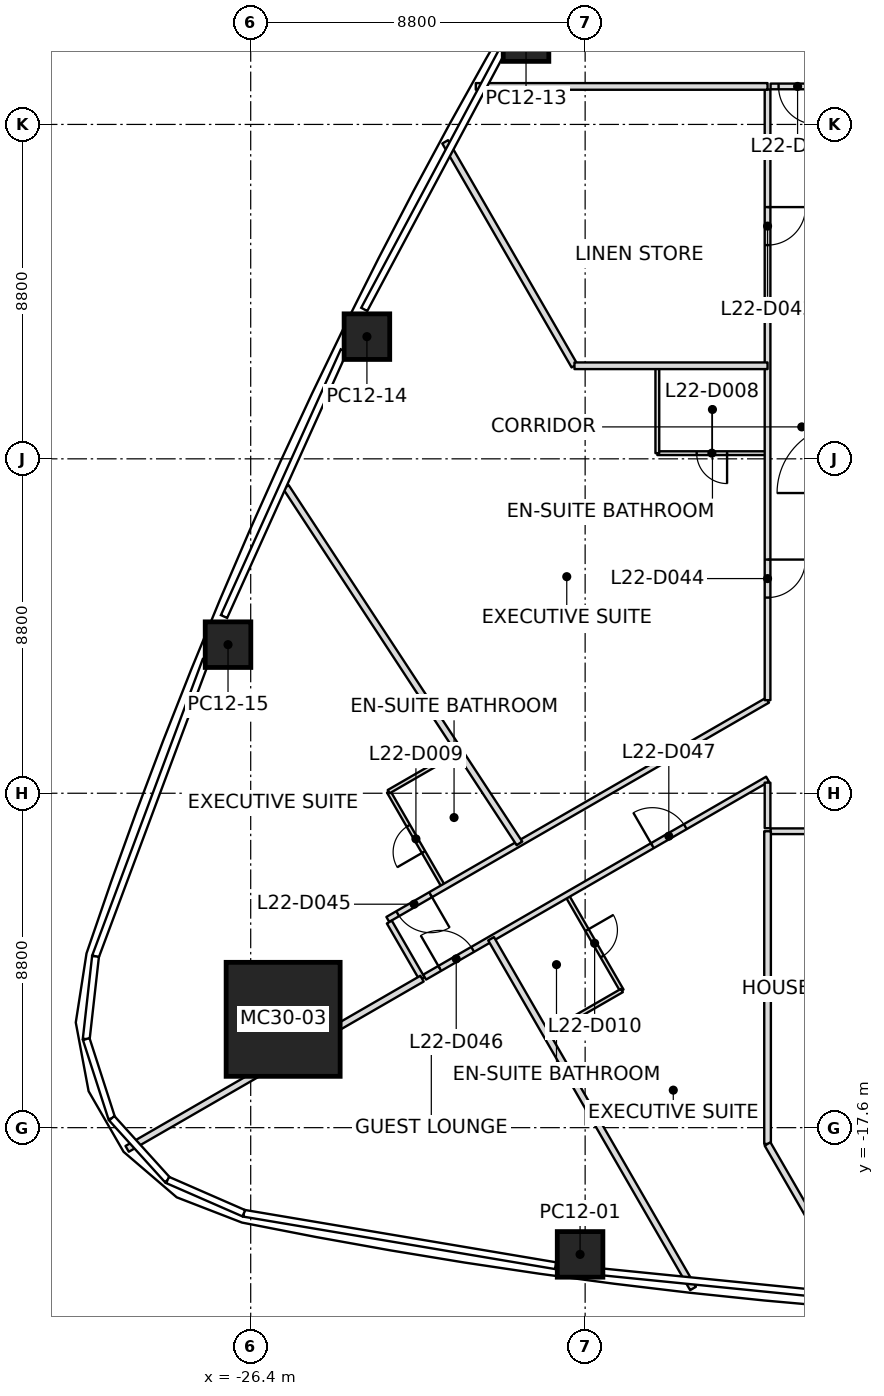
"""IFC4 building model, lengths in metres.
Left out: names, types, materials, properties, quantities, classifications, styles, units other than length and angle.
Written with IfcOpenShell. Run it as: python <this file> out.ifc"""

import sys

from ifc_helpers import new_model, si_unit, direction, frame, frame_2d, origin, origin_2d, place, context, subcontext, project, spatial, rectangle, extrude, clip, halfspace, element, fill, save


model = new_model("IFC4")
c1 = context("Model", 3, precision=1e-05, world=origin(), true_north=direction((0.0, 1.0)))
c2 = subcontext(c1, "Body", "Model", "MODEL_VIEW")
j1 = project(units=[si_unit("LENGTHUNIT", "METRE"), si_unit("PLANEANGLEUNIT", "RADIAN")], contexts=[c1])
p1 = place(None, origin())
s1 = spatial("IfcSite", under=j1, at=p1, CompositionType="ELEMENT")
p2 = place(p1, origin())
s2 = spatial("IfcBuilding", under=s1, at=p2, CompositionType="ELEMENT")
p3 = place(p2, frame((0.0, 0.0, 103.5)))
s3 = spatial("IfcBuildingStorey", under=s2, at=p3, CompositionType="ELEMENT", Elevation=103.5)
p4 = place(p3, frame((-25.546, -14.749, 0.0), z_axis=(0.030400226529, 0.017607072632, 0.999382718092), x_axis=(0.999537806302, -0.000535506504, -0.030395509632)))
e1 = element("IfcColumn", 1, at=p4, inside=s3, PredefinedType="COLUMN", context=c2, shape_type="SweptSolid", body=[
    clip(extrude(rectangle(XDim=3.0, YDim=3.0, at=origin_2d()), origin(), (0.0, 0.0, 1.0), 3.702), halfspace(frame((0.0, 0.0, 3.691)), False)),
])
p5 = place(p3, frame((-17.733, -20.935, 0.0), z_axis=(0.01919682326, 0.011280607483, 0.999752084205), x_axis=(-0.990948907943, 0.133090565371, 0.017526073608)))
e2 = element("IfcColumn", 2, at=p5, inside=s3, PredefinedType="COLUMN", context=c2, shape_type="SweptSolid", body=[
    clip(extrude(rectangle(XDim=1.2, YDim=1.2, at=origin_2d()), origin(), (0.0, 0.0, 1.0), 3.701), halfspace(frame((0.0, 0.0, 3.698)), False)),
])
p6 = place(p3, frame((-19.155, 11.059, 0.0), z_axis=(0.010688725148, -0.006202099777, 0.999923639641), x_axis=(0.499971436973, 0.8660418936, 2.7223042e-05)))
e3 = element("IfcColumn", 3, at=p6, inside=s3, PredefinedType="COLUMN", context=c2, shape_type="SweptSolid", body=[
    clip(extrude(rectangle(XDim=1.2, YDim=1.2, at=origin_2d()), origin(), (0.0, 0.0, 1.0), 3.7), halfspace(frame((0.0, 0.0, 3.699)), False)),
])
p7 = place(p3, frame((-23.342, 3.216, 0.0), z_axis=(0.015240685517, 0.002243217782, 0.999881337699), x_axis=(0.44116957044, 0.897381224024, -0.008737785047)))
e4 = element("IfcColumn", 4, at=p7, inside=s3, PredefinedType="COLUMN", context=c2, shape_type="SweptSolid", body=[
    clip(extrude(rectangle(XDim=1.2, YDim=1.2, at=origin_2d()), origin(), (0.0, 0.0, 1.0), 3.7), halfspace(frame((0.0, 0.0, 3.698)), False)),
])
p8 = place(p3, frame((-26.997, -4.89, 0.0), z_axis=(0.0193947257, 0.010950763491, 0.999751931928), x_axis=(0.380412982206, 0.924650979293, -0.0175079828)))
e5 = element("IfcColumn", 5, at=p8, inside=s3, PredefinedType="COLUMN", context=c2, shape_type="SweptSolid", body=[
    clip(extrude(rectangle(XDim=1.2, YDim=1.2, at=origin_2d()), origin(), (0.0, 0.0, 1.0), 3.701), halfspace(frame((0.0, 0.0, 3.698)), False)),
])
p9 = place(p3, frame((-21.892, -13.679, 0.0), z_axis=(0.0, 0.0, 1.0), x_axis=(-0.866027664105, -0.49999608499, 0.0)))
e6 = element("IfcWall", 6, at=p9, inside=s3, PredefinedType="PARTITIONING", context=c2, shape_type="SweptSolid", body=[
    extrude(rectangle(XDim=8.959, YDim=0.175, at=frame_2d((4.479, 0.0))), origin(), (0.0, 0.0, 1.0), 2.934),
])
p10 = place(p3, frame((-19.328, -10.12, 0.0), z_axis=(0.0, 0.0, 1.0), x_axis=(-0.548041487863, 0.836451150744, 0.0)))
e7 = element("IfcWall", 7, at=p10, inside=s3, PredefinedType="PARTITIONING", context=c2, shape_type="SweptSolid", body=[
    extrude(rectangle(XDim=11.215, YDim=0.175, at=frame_2d((5.608, 0.0))), origin(), (0.0, 0.0, 1.0), 2.934),
])
p11 = place(p3, frame((-21.283, 8.342, 0.0), z_axis=(0.0, 0.0, 1.0), x_axis=(0.500028898749, -0.866008718441, 0.0)))
e8 = element("IfcWall", 8, at=p11, inside=s3, PredefinedType="PARTITIONING", context=c2, shape_type="SweptSolid", body=[
    extrude(rectangle(XDim=6.804, YDim=0.175, at=frame_2d((3.402, 0.0))), origin(), (0.0, 0.0, 1.0), 2.934),
])
p12 = place(p3, frame((-17.881, 2.449, 0.0), z_axis=(0.0, 0.0, 1.0), x_axis=(1.0, 0.0, 0.0)))
e9 = element("IfcWall", 9, at=p12, inside=s3, PredefinedType="PARTITIONING", context=c2, shape_type="SweptSolid", body=[
    extrude(rectangle(XDim=5.081, YDim=0.175, at=frame_2d((2.54, 0.0))), origin(), (0.0, 0.0, 1.0), 3.093),
])
p13 = place(p3, frame((-12.8, 9.8, 0.0), z_axis=(0.0, 0.0, 1.0), x_axis=(-1.0, 0.0, 0.0)))
e10 = element("IfcWall", 10, at=p13, inside=s3, PredefinedType="PARTITIONING", context=c2, shape_type="SweptSolid", body=[
    extrude(rectangle(XDim=7.677, YDim=0.175, at=frame_2d((3.838, 0.0))), origin(), (0.0, 0.0, 1.0), 2.934),
])
p14 = place(p3, frame((-14.761, -21.832, 0.0), z_axis=(0.0, 0.0, 1.0), x_axis=(-0.500013467546, 0.866017628154, 0.0)))
e11 = element("IfcWall", 11, at=p14, inside=s3, PredefinedType="PARTITIONING", context=c2, shape_type="SweptSolid", body=[
    extrude(rectangle(XDim=10.627, YDim=0.175, at=frame_2d((5.313, 0.0))), origin(), (0.0, 0.0, 1.0), 2.934),
])
p15 = place(p3, frame((-12.8, -9.8, 0.0), z_axis=(0.0, 0.0, 1.0), x_axis=(0.0, -1.0, 0.0)))
e12 = element("IfcWall", 12, at=p15, inside=s3, PredefinedType="PARTITIONING", context=c2, shape_type="SweptSolid", body=[
    extrude(rectangle(XDim=8.229, YDim=0.175, at=frame_2d((4.115, 0.0))), origin(), (0.0, 0.0, 1.0), 3.15),
])
p16 = place(p3, frame((-12.8, -18.029, 0.0), z_axis=(0.0, 0.0, 1.0), x_axis=(0.500007611576, -0.866021009194, 0.0)))
e13 = element("IfcWall", 13, at=p16, inside=s3, PredefinedType="PARTITIONING", context=c2, shape_type="SweptSolid", body=[
    extrude(rectangle(XDim=4.867, YDim=0.175, at=frame_2d((2.433, 0.0))), origin(), (0.0, 0.0, 1.0), 2.934),
])
p17 = place(p3, frame((-12.8, -6.351, 0.0), z_axis=(0.0, 0.0, 1.0), x_axis=(-0.866023496323, -0.500003303805, 0.0)))
e14 = element("IfcWall", 14, at=p17, inside=s3, PredefinedType="PARTITIONING", context=c2, shape_type="SweptSolid", body=[
    extrude(rectangle(XDim=11.538, YDim=0.15, at=frame_2d((5.769, 0.0))), origin(), (0.0, 0.0, 1.0), 2.947),
])
p18 = place(p17, frame((10.238, 0.0, 0.0)))
e15 = element("IfcOpeningElement", 15, at=p18, cuts=e14, PredefinedType="OPENING", context=c2, shape_type="SweptSolid", body=[
    extrude(rectangle(XDim=1.0, YDim=2.1, at=frame_2d((0.5, 1.05))), frame((0.0, 0.075, 0.0), z_axis=(0.0, -1.0, 0.0), x_axis=(1.0, 0.0, 0.0)), (0.0, 0.0, 1.0), 0.15),
])
p19 = place(p3, frame((-22.752, -12.189, 0.0), z_axis=(0.0, 0.0, 1.0), x_axis=(0.500062383118, -0.865989383878, 0.0)))
e16 = element("IfcWall", 16, at=p19, inside=s3, PredefinedType="PARTITIONING", context=c2, shape_type="SweptSolid", body=[
    extrude(rectangle(XDim=1.72, YDim=0.15, at=frame_2d((0.86, 0.0))), origin(), (0.0, 0.0, 1.0), 2.797),
])
p20 = place(p3, frame((-21.823, -13.639, 0.0), z_axis=(0.0, 0.0, 1.0), x_axis=(0.86602247392, 0.500005074639, 0.0)))
e17 = element("IfcWall", 17, at=p20, inside=s3, PredefinedType="PARTITIONING", context=c2, shape_type="SweptSolid", body=[
    extrude(rectangle(XDim=10.419, YDim=0.15, at=frame_2d((5.209, 0.0))), origin(), (0.0, 0.0, 1.0), 2.797),
])
p21 = place(p20, frame((0.459, 0.0, 0.0)))
e18 = element("IfcOpeningElement", 18, at=p21, cuts=e17, PredefinedType="OPENING", context=c2, shape_type="SweptSolid", body=[
    extrude(rectangle(XDim=1.0, YDim=2.1, at=frame_2d((0.5, 1.05))), frame((0.0, 0.075, 0.0), z_axis=(0.0, -1.0, 0.0), x_axis=(1.0, 0.0, 0.0)), (0.0, 0.0, 1.0), 0.15),
])
p22 = place(p20, frame((6.919, 0.0, 0.0)))
e19 = element("IfcOpeningElement", 19, at=p22, cuts=e17, PredefinedType="OPENING", context=c2, shape_type="SweptSolid", body=[
    extrude(rectangle(XDim=1.0, YDim=2.1, at=frame_2d((0.5, 1.05))), frame((0.0, 0.075, 0.0), z_axis=(0.0, -1.0, 0.0), x_axis=(1.0, 0.0, 0.0)), (0.0, 0.0, 1.0), 0.15),
])
p23 = place(p3, frame((-12.8, -8.521, 0.0), z_axis=(0.0, 0.0, 1.0), x_axis=(0.0, -1.0, 0.0)))
e20 = element("IfcWall", 20, at=p23, inside=s3, PredefinedType="PARTITIONING", context=c2, shape_type="SweptSolid", body=[
    extrude(rectangle(XDim=1.199, YDim=0.15, at=frame_2d((0.6, 0.0))), origin(), (0.0, 0.0, 1.0), 2.797),
])
p24 = place(p3, frame((-12.8, 9.72, 0.0), z_axis=(0.0, 0.0, 1.0), x_axis=(0.0, -1.0, 0.0)))
e21 = element("IfcWall", 21, at=p24, inside=s3, PredefinedType="PARTITIONING", context=c2, shape_type="SweptSolid", body=[
    extrude(rectangle(XDim=16.071, YDim=0.15, at=frame_2d((8.035, 0.0))), origin(), (0.0, 0.0, 1.0), 2.947),
])
p25 = place(p24, frame((3.095, 0.0, 0.0)))
e22 = element("IfcOpeningElement", 22, at=p25, cuts=e21, PredefinedType="OPENING", context=c2, shape_type="SweptSolid", body=[
    extrude(rectangle(XDim=1.0, YDim=2.1, at=frame_2d((0.5, 1.05))), frame((0.0, 0.075, 0.0), z_axis=(0.0, -1.0, 0.0), x_axis=(1.0, 0.0, 0.0)), (0.0, 0.0, 1.0), 0.15),
])
p26 = place(p24, frame((12.371, 0.0, 0.0)))
e23 = element("IfcOpeningElement", 23, at=p26, cuts=e21, PredefinedType="OPENING", context=c2, shape_type="SweptSolid", body=[
    extrude(rectangle(XDim=1.0, YDim=2.1, at=frame_2d((0.5, 1.05))), frame((0.0, 0.075, 0.0), z_axis=(0.0, -1.0, 0.0), x_axis=(1.0, 0.0, 0.0)), (0.0, 0.0, 1.0), 0.15),
])
p27 = place(p3, frame((-12.72, -9.8, 0.0), z_axis=(0.0, 0.0, 1.0), x_axis=(1.0, 0.0, 0.0)))
e24 = element("IfcWall", 24, at=p27, inside=s3, PredefinedType="PARTITIONING", context=c2, shape_type="SweptSolid", body=[
    extrude(rectangle(XDim=25.44, YDim=0.15, at=frame_2d((12.72, 0.0))), origin(), (0.0, 0.0, 1.0), 3.017),
])
p28 = place(p27, frame((1.62, 0.0, 0.0)))
e25 = element("IfcOpeningElement", 25, at=p28, cuts=e24, PredefinedType="OPENING", context=c2, shape_type="SweptSolid", body=[
    extrude(rectangle(XDim=1.0, YDim=2.1, at=frame_2d((0.5, 1.05))), frame((0.0, 0.075, 0.0), z_axis=(0.0, -1.0, 0.0), x_axis=(1.0, 0.0, 0.0)), (0.0, 0.0, 1.0), 0.15),
])
p29 = place(p27, frame((7.22, 0.0, 0.0)))
e26 = element("IfcOpeningElement", 26, at=p29, cuts=e24, PredefinedType="OPENING", context=c2, shape_type="SweptSolid", body=[
    extrude(rectangle(XDim=1.0, YDim=2.1, at=frame_2d((0.5, 1.05))), frame((0.0, 0.075, 0.0), z_axis=(0.0, -1.0, 0.0), x_axis=(1.0, 0.0, 0.0)), (0.0, 0.0, 1.0), 0.15),
])
p30 = place(p27, frame((10.02, 0.0, 0.0)))
e27 = element("IfcOpeningElement", 27, at=p30, cuts=e24, PredefinedType="OPENING", context=c2, shape_type="SweptSolid", body=[
    extrude(rectangle(XDim=1.0, YDim=2.1, at=frame_2d((0.5, 1.05))), frame((0.0, 0.075, 0.0), z_axis=(0.0, -1.0, 0.0), x_axis=(1.0, 0.0, 0.0)), (0.0, 0.0, 1.0), 0.15),
])
p31 = place(p27, frame((15.42, 0.0, 0.0)))
e28 = element("IfcOpeningElement", 28, at=p31, cuts=e24, PredefinedType="OPENING", context=c2, shape_type="SweptSolid", body=[
    extrude(rectangle(XDim=1.0, YDim=2.1, at=frame_2d((0.5, 1.05))), frame((0.0, 0.075, 0.0), z_axis=(0.0, -1.0, 0.0), x_axis=(1.0, 0.0, 0.0)), (0.0, 0.0, 1.0), 0.15),
])
p32 = place(p27, frame((19.82, 0.0, 0.0)))
e29 = element("IfcOpeningElement", 29, at=p32, cuts=e24, PredefinedType="OPENING", context=c2, shape_type="SweptSolid", body=[
    extrude(rectangle(XDim=1.0, YDim=2.1, at=frame_2d((0.5, 1.05))), frame((0.0, 0.075, 0.0), z_axis=(0.0, -1.0, 0.0), x_axis=(1.0, 0.0, 0.0)), (0.0, 0.0, 1.0), 0.15),
])
p33 = place(p3, frame((-4.08, 9.8, 0.0), z_axis=(0.0, 0.0, 1.0), x_axis=(-1.0, 0.0, 0.0)))
e30 = element("IfcWall", 30, at=p33, inside=s3, PredefinedType="PARTITIONING", context=c2, shape_type="SweptSolid", body=[
    extrude(rectangle(XDim=8.64, YDim=0.15, at=frame_2d((4.32, 0.0))), origin(), (0.0, 0.0, 1.0), 2.947),
])
p34 = place(p33, frame((7.43, 0.0, 0.0)))
e31 = element("IfcOpeningElement", 31, at=p34, cuts=e30, PredefinedType="OPENING", context=c2, shape_type="SweptSolid", body=[
    extrude(rectangle(XDim=1.0, YDim=2.1, at=frame_2d((0.5, 1.05))), frame((0.0, 0.075, 0.0), z_axis=(0.0, -1.0, 0.0), x_axis=(1.0, 0.0, 0.0)), (0.0, 0.0, 1.0), 0.15),
])
p35 = place(p3, frame((-21.335, -11.244, 0.0), z_axis=(0.0, 0.0, 1.0), x_axis=(-0.499999802827, 0.866025517622, 0.0)))
e32 = element("IfcWall", 32, at=p35, inside=s3, PredefinedType="PARTITIONING", context=c2, shape_type="SweptSolid", body=[
    extrude(rectangle(XDim=2.87, YDim=0.1, at=frame_2d((1.435, 0.0))), origin(), (0.0, 0.0, 1.0), 3.15),
])
p36 = place(p35, frame((1.035, 0.0, 0.0)))
e33 = element("IfcOpeningElement", 33, at=p36, cuts=e32, PredefinedType="OPENING", context=c2, shape_type="SweptSolid", body=[
    extrude(rectangle(XDim=0.8, YDim=2.1, at=frame_2d((0.4, 1.05))), frame((0.0, 0.05, 0.0), z_axis=(0.0, -1.0, 0.0), x_axis=(1.0, 0.0, 0.0)), (0.0, 0.0, 1.0), 0.1),
])
p37 = place(p3, frame((-22.77, -8.758, 0.0), z_axis=(0.0, 0.0, 1.0), x_axis=(0.866017224141, 0.500014167291, 0.0)))
e34 = element("IfcWall", 34, at=p37, inside=s3, PredefinedType="PARTITIONING", context=c2, shape_type="SweptSolid", body=[
    extrude(rectangle(XDim=2.27, YDim=0.1, at=frame_2d((1.135, 0.0))), origin(), (0.0, 0.0, 1.0), 3.15),
])
p38 = place(p3, frame((-18.068, -11.505, 0.0), z_axis=(0.0, 0.0, 1.0), x_axis=(0.500036638401, -0.866004249561, 0.0)))
e35 = element("IfcWall", 35, at=p38, inside=s3, PredefinedType="PARTITIONING", context=c2, shape_type="SweptSolid", body=[
    extrude(rectangle(XDim=2.87, YDim=0.1, at=frame_2d((1.435, 0.0))), origin(), (0.0, 0.0, 1.0), 2.797),
])
p39 = place(p38, frame((1.035, 0.0, 0.0)))
e36 = element("IfcOpeningElement", 36, at=p39, cuts=e35, PredefinedType="OPENING", context=c2, shape_type="SweptSolid", body=[
    extrude(rectangle(XDim=0.8, YDim=2.1, at=frame_2d((0.4, 1.05))), frame((0.0, 0.05, 0.0), z_axis=(0.0, -1.0, 0.0), x_axis=(1.0, 0.0, 0.0)), (0.0, 0.0, 1.0), 0.1),
])
p40 = place(p3, frame((-16.633, -13.991, 0.0), z_axis=(0.0, 0.0, 1.0), x_axis=(-0.866017224141, -0.500014167291, 0.0)))
e37 = element("IfcWall", 37, at=p40, inside=s3, PredefinedType="PARTITIONING", context=c2, shape_type="SweptSolid", body=[
    extrude(rectangle(XDim=2.27, YDim=0.1, at=frame_2d((1.135, 0.0))), origin(), (0.0, 0.0, 1.0), 3.15),
])
p41 = place(p3, frame((-12.83, 0.149, 0.0), z_axis=(0.0, 0.0, 1.0), x_axis=(-1.0, 0.0, 0.0)))
e38 = element("IfcWall", 38, at=p41, inside=s3, PredefinedType="PARTITIONING", context=c2, shape_type="SweptSolid", body=[
    extrude(rectangle(XDim=2.87, YDim=0.1, at=frame_2d((1.435, 0.0))), origin(), (0.0, 0.0, 1.0), 3.15),
])
p42 = place(p41, frame((1.035, 0.0, 0.0)))
e39 = element("IfcOpeningElement", 39, at=p42, cuts=e38, PredefinedType="OPENING", context=c2, shape_type="SweptSolid", body=[
    extrude(rectangle(XDim=0.8, YDim=2.1, at=frame_2d((0.4, 1.05))), frame((0.0, 0.05, 0.0), z_axis=(0.0, -1.0, 0.0), x_axis=(1.0, 0.0, 0.0)), (0.0, 0.0, 1.0), 0.1),
])
p43 = place(p3, frame((-15.7, 0.149, 0.0), z_axis=(0.0, 0.0, 1.0), x_axis=(0.0, 1.0, 0.0)))
e40 = element("IfcWall", 40, at=p43, inside=s3, PredefinedType="PARTITIONING", context=c2, shape_type="SweptSolid", body=[
    extrude(rectangle(XDim=2.27, YDim=0.1, at=frame_2d((1.135, 0.0))), origin(), (0.0, 0.0, 1.0), 3.15),
])
p44 = place(p34, origin())
e41 = element("IfcDoor", 41, at=p44, inside=s3, OperationType="SINGLE_SWING_RIGHT", PredefinedType="DOOR", context=c2, shape_type="SweptSolid", body=[
    extrude(rectangle(XDim=1.0, YDim=2.1, at=frame_2d((0.5, 1.05))), frame((0.0, 0.025, 0.0), z_axis=(0.0, -1.0, 0.0), x_axis=(1.0, 0.0, 0.0)), (0.0, 0.0, 1.0), 0.05),
])
fill(e31, e41)
p45 = place(p25, origin())
e42 = element("IfcDoor", 42, at=p45, inside=s3, OperationType="SINGLE_SWING_LEFT", PredefinedType="DOOR", context=c2, shape_type="SweptSolid", body=[
    extrude(rectangle(XDim=1.0, YDim=2.1, at=frame_2d((0.5, 1.05))), frame((0.0, 0.025, 0.0), z_axis=(0.0, -1.0, 0.0), x_axis=(1.0, 0.0, 0.0)), (0.0, 0.0, 1.0), 0.05),
])
fill(e22, e42)
p46 = place(p26, origin())
e43 = element("IfcDoor", 43, at=p46, inside=s3, OperationType="SINGLE_SWING_RIGHT", PredefinedType="DOOR", context=c2, shape_type="SweptSolid", body=[
    extrude(rectangle(XDim=1.0, YDim=2.1, at=frame_2d((0.5, 1.05))), frame((0.0, 0.025, 0.0), z_axis=(0.0, -1.0, 0.0), x_axis=(1.0, 0.0, 0.0)), (0.0, 0.0, 1.0), 0.05),
])
fill(e23, e43)
p47 = place(p42, origin())
e44 = element("IfcDoor", 44, at=p47, inside=s3, OperationType="SINGLE_SWING_RIGHT", PredefinedType="DOOR", context=c2, shape_type="SweptSolid", body=[
    extrude(rectangle(XDim=0.8, YDim=2.1, at=frame_2d((0.4, 1.05))), frame((0.0, 0.025, 0.0), z_axis=(0.0, -1.0, 0.0), x_axis=(1.0, 0.0, 0.0)), (0.0, 0.0, 1.0), 0.05),
])
fill(e39, e44)
p48 = place(p18, origin())
e45 = element("IfcDoor", 45, at=p48, inside=s3, OperationType="SINGLE_SWING_RIGHT", PredefinedType="DOOR", context=c2, shape_type="SweptSolid", body=[
    extrude(rectangle(XDim=1.0, YDim=2.1, at=frame_2d((0.5, 1.05))), frame((0.0, 0.025, 0.0), z_axis=(0.0, -1.0, 0.0), x_axis=(1.0, 0.0, 0.0)), (0.0, 0.0, 1.0), 0.05),
])
fill(e15, e45)
p49 = place(p36, origin())
e46 = element("IfcDoor", 46, at=p49, inside=s3, OperationType="SINGLE_SWING_RIGHT", PredefinedType="DOOR", context=c2, shape_type="SweptSolid", body=[
    extrude(rectangle(XDim=0.8, YDim=2.1, at=frame_2d((0.4, 1.05))), frame((0.0, 0.025, 0.0), z_axis=(0.0, -1.0, 0.0), x_axis=(1.0, 0.0, 0.0)), (0.0, 0.0, 1.0), 0.05),
])
fill(e33, e46)
p50 = place(p21, origin())
e47 = element("IfcDoor", 47, at=p50, inside=s3, OperationType="SINGLE_SWING_LEFT", PredefinedType="DOOR", context=c2, shape_type="SweptSolid", body=[
    extrude(rectangle(XDim=1.0, YDim=2.1, at=frame_2d((0.5, 1.05))), frame((0.0, 0.025, 0.0), z_axis=(0.0, -1.0, 0.0), x_axis=(1.0, 0.0, 0.0)), (0.0, 0.0, 1.0), 0.05),
])
fill(e18, e47)
p51 = place(p22, origin())
e48 = element("IfcDoor", 48, at=p51, inside=s3, OperationType="SINGLE_SWING_LEFT", PredefinedType="DOOR", context=c2, shape_type="SweptSolid", body=[
    extrude(rectangle(XDim=1.0, YDim=2.1, at=frame_2d((0.5, 1.05))), frame((0.0, 0.025, 0.0), z_axis=(0.0, -1.0, 0.0), x_axis=(1.0, 0.0, 0.0)), (0.0, 0.0, 1.0), 0.05),
])
fill(e19, e48)
p52 = place(p39, origin())
e49 = element("IfcDoor", 49, at=p52, inside=s3, OperationType="SINGLE_SWING_LEFT", PredefinedType="DOOR", context=c2, shape_type="SweptSolid", body=[
    extrude(rectangle(XDim=0.8, YDim=2.1, at=frame_2d((0.4, 1.05))), frame((0.0, 0.025, 0.0), z_axis=(0.0, -1.0, 0.0), x_axis=(1.0, 0.0, 0.0)), (0.0, 0.0, 1.0), 0.05),
])
fill(e36, e49)
save(model, sys.argv[1])
